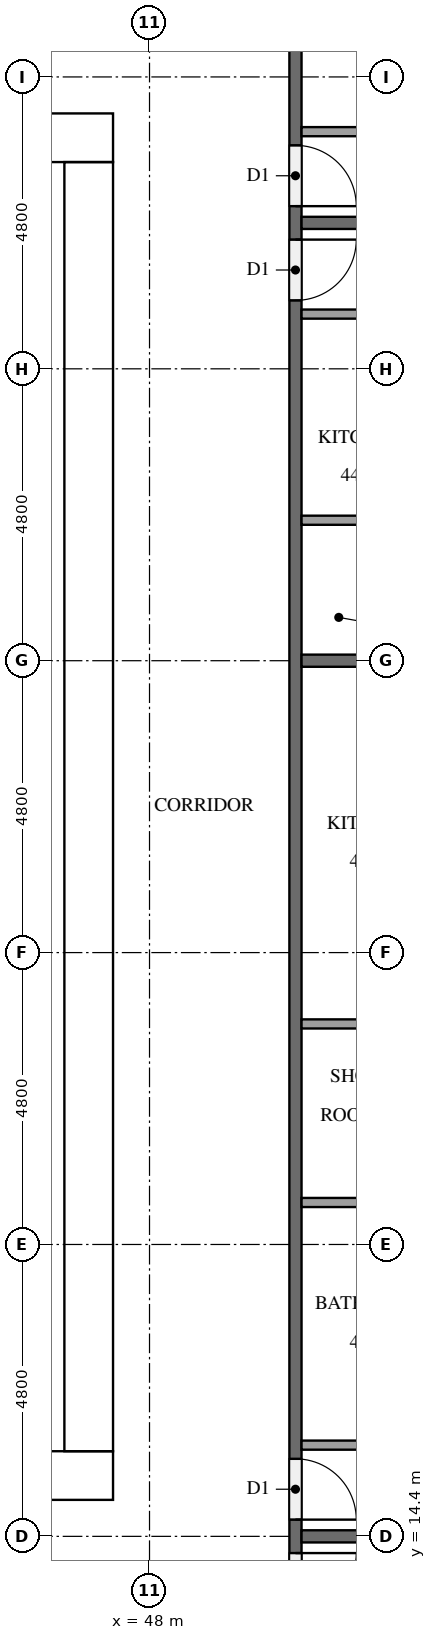
"""IFC4 building model, lengths in metres.
Left out: names, types, materials, properties, quantities, classifications, styles, units other than length and angle.
Written with IfcOpenShell. Run it as: python <this file> out.ifc"""

import sys

from ifc_helpers import new_model, si_unit, direction, frame, frame_2d, origin, place, context, subcontext, project, spatial, rectangle, extrude, element, fill, save


model = new_model("IFC4")
c1 = context("Model", 3, precision=1e-05, world=origin(), true_north=direction((0.0, 1.0)))
c2 = subcontext(c1, "Body", "Model", "MODEL_VIEW")
j1 = project(units=[si_unit("LENGTHUNIT", "METRE"), si_unit("PLANEANGLEUNIT", "RADIAN")], contexts=[c1])
p1 = place(None, origin())
s1 = spatial("IfcSite", under=j1, at=p1, CompositionType="ELEMENT")
p2 = place(p1, origin())
s2 = spatial("IfcBuilding", under=s1, at=p2, CompositionType="ELEMENT")
p3 = place(p2, frame((0.0, 0.0, 170.0)))
s3 = spatial("IfcBuildingStorey", under=s2, at=p3, CompositionType="ELEMENT", Elevation=170.0)
p4 = place(p3, frame((15.0, 15.4, 0.0), z_axis=(0.0, 0.0, 1.0), x_axis=(1.0, 0.0, 0.0)))
e1 = element("IfcWall", 1, at=p4, inside=s3, PredefinedType="SHEAR", context=c2, shape_type="SweptSolid", body=[
    extrude(rectangle(XDim=32.4, YDim=0.8, at=frame_2d((16.2, 0.0))), origin(), (0.0, 0.0, 1.0), 3.1),
])
p5 = place(p4, frame((15.3, 0.0, 0.0)))
e2 = element("IfcOpeningElement", 2, at=p5, cuts=e1, PredefinedType="OPENING", context=c2, shape_type="SweptSolid", body=[
    extrude(rectangle(XDim=1.8, YDim=2.1, at=frame_2d((0.9, 1.05))), frame((0.0, 0.41, 0.0), z_axis=(0.0, -1.0, 0.0), x_axis=(1.0, 0.0, 0.0)), (0.0, 0.0, 1.0), 0.82),
])
p6 = place(p3, frame((15.0, 37.4, 0.0), z_axis=(0.0, 0.0, 1.0), x_axis=(1.0, 0.0, 0.0)))
e3 = element("IfcWall", 3, at=p6, inside=s3, PredefinedType="SHEAR", context=c2, shape_type="SweptSolid", body=[
    extrude(rectangle(XDim=32.4, YDim=0.8, at=frame_2d((16.2, 0.0))), origin(), (0.0, 0.0, 1.0), 3.1),
])
p7 = place(p6, frame((15.3, 0.0, 0.0)))
e4 = element("IfcOpeningElement", 4, at=p7, cuts=e3, PredefinedType="OPENING", context=c2, shape_type="SweptSolid", body=[
    extrude(rectangle(XDim=1.8, YDim=2.1, at=frame_2d((0.9, 1.05))), frame((0.0, 0.41, 0.0), z_axis=(0.0, -1.0, 0.0), x_axis=(1.0, 0.0, 0.0)), (0.0, 0.0, 1.0), 0.82),
])
p8 = place(p6, frame((1.51, 0.0, 0.0)))
e5 = element("IfcOpeningElement", 5, at=p8, cuts=e3, PredefinedType="OPENING", context=c2, shape_type="SweptSolid", body=[
    extrude(rectangle(XDim=1.0, YDim=2.1, at=frame_2d((0.5, 1.05))), frame((0.0, 0.41, 0.0), z_axis=(0.0, -1.0, 0.0), x_axis=(1.0, 0.0, 0.0)), (0.0, 0.0, 1.0), 0.82),
])
p9 = place(p6, frame((5.11, 0.0, 0.0)))
e6 = element("IfcOpeningElement", 6, at=p9, cuts=e3, PredefinedType="OPENING", context=c2, shape_type="SweptSolid", body=[
    extrude(rectangle(XDim=1.0, YDim=2.1, at=frame_2d((0.5, 1.05))), frame((0.0, 0.41, 0.0), z_axis=(0.0, -1.0, 0.0), x_axis=(1.0, 0.0, 0.0)), (0.0, 0.0, 1.0), 0.82),
])
p10 = place(p3, frame((47.0, 15.8, 0.0), z_axis=(0.0, 0.0, 1.0), x_axis=(0.0, 1.0, 0.0)))
e7 = element("IfcWall", 7, at=p10, inside=s3, PredefinedType="SHEAR", context=c2, shape_type="SweptSolid", body=[
    extrude(rectangle(XDim=21.2, YDim=0.8, at=frame_2d((10.6, 0.0))), origin(), (0.0, 0.0, 1.0), 3.1),
])
p11 = place(p10, frame((10.3, 0.0, 0.0)))
e8 = element("IfcOpeningElement", 8, at=p11, cuts=e7, PredefinedType="OPENING", context=c2, shape_type="SweptSolid", body=[
    extrude(rectangle(XDim=1.2, YDim=2.1, at=frame_2d((0.6, 1.05))), frame((0.0, 0.41, 0.0), z_axis=(0.0, -1.0, 0.0), x_axis=(1.0, 0.0, 0.0)), (0.0, 0.0, 1.0), 0.82),
])
p12 = place(p3, frame((50.4, 40.7, 0.0), z_axis=(0.0, 0.0, 1.0), x_axis=(0.0, -1.0, 0.0)))
e9 = element("IfcWall", 9, at=p12, inside=s3, PredefinedType="PARTITIONING", context=c2, shape_type="SweptSolid", body=[
    extrude(rectangle(XDim=28.6, YDim=0.2, at=frame_2d((14.3, 0.0))), origin(), (0.0, 0.0, 1.0), 3.1),
])
p13 = place(p12, frame((26.575, 0.0, 0.0)))
e10 = element("IfcOpeningElement", 10, at=p13, cuts=e9, PredefinedType="OPENING", context=c2, shape_type="SweptSolid", body=[
    extrude(rectangle(XDim=1.0, YDim=2.1, at=frame_2d((0.5, 1.05))), frame((0.0, 0.11, 0.0), z_axis=(0.0, -1.0, 0.0), x_axis=(1.0, 0.0, 0.0)), (0.0, 0.0, 1.0), 0.22),
])
p14 = place(p12, frame((25.025, 0.0, 0.0)))
e11 = element("IfcOpeningElement", 11, at=p14, cuts=e9, PredefinedType="OPENING", context=c2, shape_type="SweptSolid", body=[
    extrude(rectangle(XDim=1.0, YDim=2.1, at=frame_2d((0.5, 1.05))), frame((0.0, 0.11, 0.0), z_axis=(0.0, -1.0, 0.0), x_axis=(1.0, 0.0, 0.0)), (0.0, 0.0, 1.0), 0.22),
])
p15 = place(p12, frame((4.975, 0.0, 0.0)))
e12 = element("IfcOpeningElement", 12, at=p15, cuts=e9, PredefinedType="OPENING", context=c2, shape_type="SweptSolid", body=[
    extrude(rectangle(XDim=1.0, YDim=2.1, at=frame_2d((0.5, 1.05))), frame((0.0, 0.11, 0.0), z_axis=(0.0, -1.0, 0.0), x_axis=(1.0, 0.0, 0.0)), (0.0, 0.0, 1.0), 0.22),
])
p16 = place(p12, frame((3.425, 0.0, 0.0)))
e13 = element("IfcOpeningElement", 13, at=p16, cuts=e9, PredefinedType="OPENING", context=c2, shape_type="SweptSolid", body=[
    extrude(rectangle(XDim=1.0, YDim=2.1, at=frame_2d((0.5, 1.05))), frame((0.0, 0.11, 0.0), z_axis=(0.0, -1.0, 0.0), x_axis=(1.0, 0.0, 0.0)), (0.0, 0.0, 1.0), 0.22),
])
p17 = place(p3, frame((50.5, 14.4, 0.0), z_axis=(0.0, 0.0, 1.0), x_axis=(1.0, 0.0, 0.0)))
e14 = element("IfcWall", 14, at=p17, inside=s3, PredefinedType="PARTITIONING", context=c2, shape_type="SweptSolid", body=[
    extrude(rectangle(XDim=6.725, YDim=0.2, at=frame_2d((3.363, 0.0))), origin(), (0.0, 0.0, 1.0), 3.1),
])
for number, where, z_axis, x_axis in (
    (15, (50.5, 28.8, 0.0), (0.0, 0.0, 1.0), (1.0, 0.0, 0.0)),
    (16, (50.5, 36.0, 0.0), (0.0, 0.0, 1.0), (1.0, 0.0, 0.0)),
):
    element("IfcWall", number, at=place(p3, frame(where, z_axis=z_axis, x_axis=x_axis)), inside=s3, PredefinedType="PARTITIONING", context=c2, shape_type="SweptSolid", body=[
        extrude(rectangle(XDim=7.0, YDim=0.2, at=frame_2d((3.5, 0.0))), origin(), (0.0, 0.0, 1.0), 3.1),
    ])
for number, where, z_axis, x_axis in (
    (17, (50.5, 19.89, 0.0), (0.0, 0.0, 1.0), (1.0, 0.0, 0.0)),
    (18, (50.5, 22.827, 0.0), (0.0, 0.0, 1.0), (1.0, 0.0, 0.0)),
):
    element("IfcWall", number, at=place(p3, frame(where, z_axis=z_axis, x_axis=x_axis)), inside=s3, PredefinedType="PARTITIONING", context=c2, shape_type="SweptSolid", body=[
        extrude(rectangle(XDim=2.225, YDim=0.15, at=frame_2d((1.113, 0.0))), origin(), (0.0, 0.0, 1.0), 3.1),
    ])
p18 = place(p3, frame((50.5, 15.9, 0.0), z_axis=(0.0, 0.0, 1.0), x_axis=(1.0, 0.0, 0.0)))
e19 = element("IfcWall", 19, at=p18, inside=s3, PredefinedType="PARTITIONING", context=c2, shape_type="SweptSolid", body=[
    extrude(rectangle(XDim=2.375, YDim=0.15, at=frame_2d((1.188, 0.0))), origin(), (0.0, 0.0, 1.0), 3.1),
])
p19 = place(p3, frame((50.5, 31.11, 0.0), z_axis=(0.0, 0.0, 1.0), x_axis=(1.0, 0.0, 0.0)))
e20 = element("IfcWall", 20, at=p19, inside=s3, PredefinedType="PARTITIONING", context=c2, shape_type="SweptSolid", body=[
    extrude(rectangle(XDim=1.925, YDim=0.15, at=frame_2d((0.962, 0.0))), origin(), (0.0, 0.0, 1.0), 3.1),
])
p20 = place(p3, frame((50.5, 34.5, 0.0), z_axis=(0.0, 0.0, 1.0), x_axis=(1.0, 0.0, 0.0)))
e21 = element("IfcWall", 21, at=p20, inside=s3, PredefinedType="PARTITIONING", context=c2, shape_type="SweptSolid", body=[
    extrude(rectangle(XDim=2.075, YDim=0.15, at=frame_2d((1.038, 0.0))), origin(), (0.0, 0.0, 1.0), 3.1),
])
p21 = place(p3, frame((50.5, 37.5, 0.0), z_axis=(0.0, 0.0, 1.0), x_axis=(1.0, 0.0, 0.0)))
e22 = element("IfcWall", 22, at=p21, inside=s3, PredefinedType="PARTITIONING", context=c2, shape_type="SweptSolid", body=[
    extrude(rectangle(XDim=1.925, YDim=0.15, at=frame_2d((0.962, 0.0))), origin(), (0.0, 0.0, 1.0), 3.1),
])
p22 = place(p11, origin())
e23 = element("IfcDoor", 23, at=p22, inside=s3, OperationType="SINGLE_SWING_RIGHT", PredefinedType="DOOR", context=c2, shape_type="SweptSolid", body=[
    extrude(rectangle(XDim=1.2, YDim=2.1, at=frame_2d((0.6, 1.05))), frame((0.0, 0.025, 0.0), z_axis=(0.0, -1.0, 0.0), x_axis=(1.0, 0.0, 0.0)), (0.0, 0.0, 1.0), 0.05),
])
fill(e8, e23)
p23 = place(p13, origin())
e24 = element("IfcDoor", 24, at=p23, inside=s3, OperationType="SINGLE_SWING_LEFT", PredefinedType="DOOR", context=c2, shape_type="SweptSolid", body=[
    extrude(rectangle(XDim=1.0, YDim=2.1, at=frame_2d((0.5, 1.05))), frame((0.0, 0.025, 0.0), z_axis=(0.0, -1.0, 0.0), x_axis=(1.0, 0.0, 0.0)), (0.0, 0.0, 1.0), 0.05),
])
fill(e10, e24)
p24 = place(p14, origin())
e25 = element("IfcDoor", 25, at=p24, inside=s3, OperationType="SINGLE_SWING_RIGHT", PredefinedType="DOOR", context=c2, shape_type="SweptSolid", body=[
    extrude(rectangle(XDim=1.0, YDim=2.1, at=frame_2d((0.5, 1.05))), frame((0.0, 0.025, 0.0), z_axis=(0.0, -1.0, 0.0), x_axis=(1.0, 0.0, 0.0)), (0.0, 0.0, 1.0), 0.05),
])
fill(e11, e25)
p25 = place(p15, origin())
e26 = element("IfcDoor", 26, at=p25, inside=s3, OperationType="SINGLE_SWING_LEFT", PredefinedType="DOOR", context=c2, shape_type="SweptSolid", body=[
    extrude(rectangle(XDim=1.0, YDim=2.1, at=frame_2d((0.5, 1.05))), frame((0.0, 0.025, 0.0), z_axis=(0.0, -1.0, 0.0), x_axis=(1.0, 0.0, 0.0)), (0.0, 0.0, 1.0), 0.05),
])
fill(e12, e26)
p26 = place(p16, origin())
e27 = element("IfcDoor", 27, at=p26, inside=s3, OperationType="SINGLE_SWING_RIGHT", PredefinedType="DOOR", context=c2, shape_type="SweptSolid", body=[
    extrude(rectangle(XDim=1.0, YDim=2.1, at=frame_2d((0.5, 1.05))), frame((0.0, 0.025, 0.0), z_axis=(0.0, -1.0, 0.0), x_axis=(1.0, 0.0, 0.0)), (0.0, 0.0, 1.0), 0.05),
])
fill(e13, e27)
save(model, sys.argv[1])
